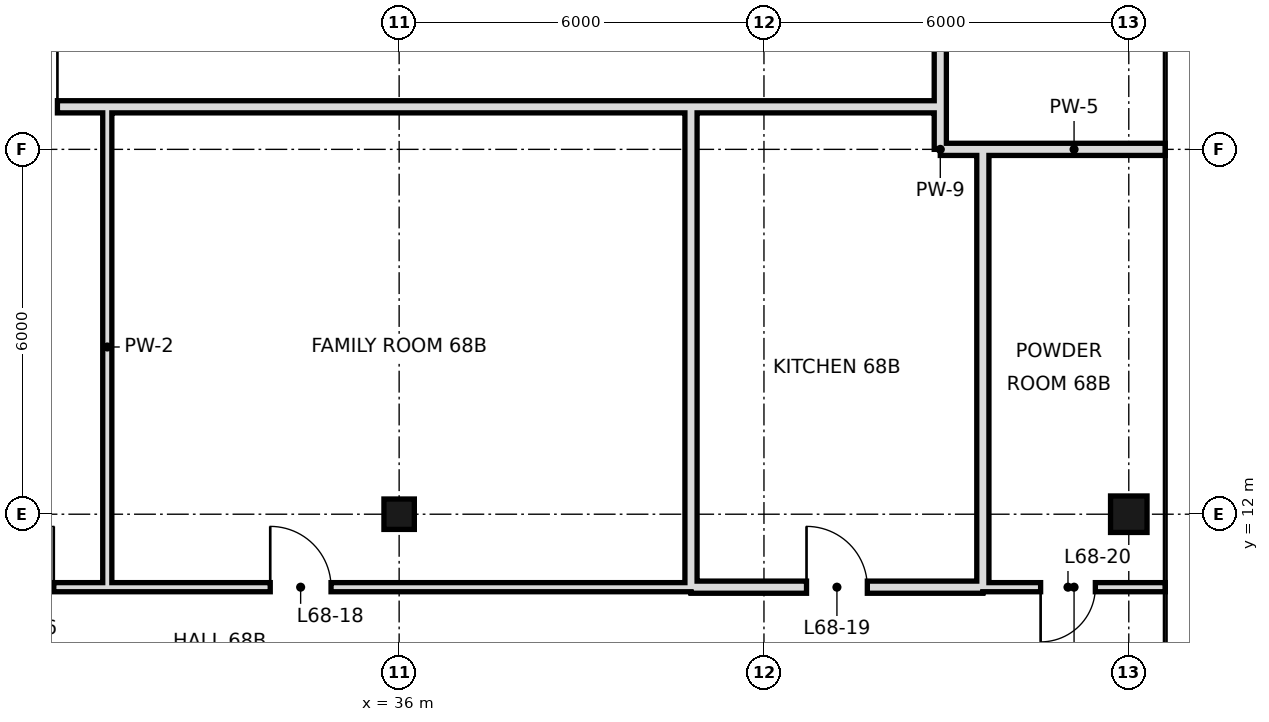
"""IFC4 building model, lengths in metres.
Left out: names, types, materials, properties, quantities, classifications, styles, units other than length and angle.
Written with IfcOpenShell. Run it as: python <this file> out.ifc"""

import sys

from ifc_helpers import new_model, si_unit, direction, frame, frame_2d, origin, origin_2d, place, context, subcontext, project, spatial, rectangle, hollow_rectangle, extrude, element, fill, save


model = new_model("IFC4")
c1 = context("Model", 3, precision=1e-05, world=origin(), true_north=direction((0.0, 1.0)))
c2 = subcontext(c1, "Body", "Model", "MODEL_VIEW")
j1 = project(units=[si_unit("LENGTHUNIT", "METRE"), si_unit("PLANEANGLEUNIT", "RADIAN")], contexts=[c1])
p1 = place(None, origin())
s1 = spatial("IfcSite", under=j1, at=p1, CompositionType="ELEMENT")
p2 = place(p1, origin())
s2 = spatial("IfcBuilding", under=s1, at=p2, CompositionType="ELEMENT")
p3 = place(p2, frame((0.0, 0.0, 290.8)))
s3 = spatial("IfcBuildingStorey", under=s2, at=p3, CompositionType="ELEMENT", Elevation=290.8)
p4 = place(p3, frame((36.0, 12.0, 0.0), z_axis=(0.0, 0.0, 1.0), x_axis=(1.0, 0.0, 0.0)))
e1 = element("IfcColumn", 1, at=p4, inside=s3, PredefinedType="COLUMN", context=c2, shape_type="SweptSolid", body=[
    extrude(hollow_rectangle(XDim=0.5, YDim=0.5, WallThickness=0.025, at=origin_2d()), origin(), (0.0, 0.0, 1.0), 3.6),
])
p5 = place(p3, frame((48.0, 12.0, 0.0), z_axis=(0.0, 0.0, 1.0), x_axis=(1.0, 0.0, 0.0)))
e2 = element("IfcColumn", 2, at=p5, inside=s3, PredefinedType="COLUMN", context=c2, shape_type="SweptSolid", body=[
    extrude(hollow_rectangle(XDim=0.6, YDim=0.6, WallThickness=0.028, at=origin_2d()), origin(), (0.0, 0.0, 1.0), 3.6),
])
p6 = place(p3, frame((31.2, 10.8, 0.0), z_axis=(0.0, 0.0, 1.0), x_axis=(0.0, 1.0, 0.0)))
e3 = element("IfcWall", 3, at=p6, inside=s3, PredefinedType="PARTITIONING", context=c2, shape_type="SweptSolid", body=[
    extrude(rectangle(XDim=7.9, YDim=0.15, at=frame_2d((3.95, 0.0))), origin(), (0.0, 0.0, 1.0), 3.42),
])
p7 = place(p3, frame((40.8, 10.8, 0.0), z_axis=(0.0, 0.0, 1.0), x_axis=(0.0, 1.0, 0.0)))
e4 = element("IfcWall", 4, at=p7, inside=s3, PredefinedType="SOLIDWALL", context=c2, shape_type="SweptSolid", body=[
    extrude(rectangle(XDim=7.9, YDim=0.2, at=frame_2d((3.95, 0.0))), origin(), (0.0, 0.0, 1.0), 2.72),
])
p8 = place(p3, frame((44.9, 18.7, 0.0), z_axis=(0.0, 0.0, 1.0), x_axis=(0.0, 1.0, 0.0)))
e5 = element("IfcWall", 5, at=p8, inside=s3, PredefinedType="SOLIDWALL", context=c2, shape_type="SweptSolid", body=[
    extrude(rectangle(XDim=27.249, YDim=0.2, at=frame_2d((13.625, 0.0))), origin(), (0.0, 0.0, 1.0), 2.97),
])
p9 = place(p8, frame((17.54, 0.0, 0.0)))
e6 = element("IfcOpeningElement", 6, at=p9, cuts=e5, PredefinedType="OPENING", context=c2, shape_type="SweptSolid", body=[
    extrude(rectangle(XDim=1.2, YDim=2.4, at=frame_2d((0.6, 1.2))), frame((0.0, 0.11, 0.0), z_axis=(0.0, -1.0, 0.0), x_axis=(1.0, 0.0, 0.0)), (0.0, 0.0, 1.0), 0.22),
])
p10 = place(p3, frame((44.9, 18.0, 0.0), z_axis=(0.0, 0.0, 1.0), x_axis=(0.0, 1.0, 0.0)))
e7 = element("IfcWall", 7, at=p10, inside=s3, PredefinedType="SOLIDWALL", context=c2, shape_type="SweptSolid", body=[
    extrude(rectangle(XDim=0.7, YDim=0.2, at=frame_2d((0.35, 0.0))), origin(), (0.0, 0.0, 1.0), 2.97),
])
p11 = place(p3, frame((45.6, 10.8, 0.0), z_axis=(0.0, 0.0, 1.0), x_axis=(0.0, 1.0, 0.0)))
e8 = element("IfcWall", 8, at=p11, inside=s3, PredefinedType="SOLIDWALL", context=c2, shape_type="SweptSolid", body=[
    extrude(rectangle(XDim=7.2, YDim=0.2, at=frame_2d((3.6, 0.0))), origin(), (0.0, 0.0, 1.0), 2.72),
])
p12 = place(p3, frame((40.8, 10.8, 0.0), z_axis=(0.0, 0.0, 1.0), x_axis=(1.0, 0.0, 0.0)))
e9 = element("IfcWall", 9, at=p12, inside=s3, PredefinedType="SOLIDWALL", context=c2, shape_type="SweptSolid", body=[
    extrude(rectangle(XDim=4.8, YDim=0.2, at=frame_2d((2.4, 0.0))), origin(), (0.0, 0.0, 1.0), 2.72),
])
p13 = place(p12, frame((1.9, 0.0, 0.0)))
e10 = element("IfcOpeningElement", 10, at=p13, cuts=e9, PredefinedType="OPENING", context=c2, shape_type="SweptSolid", body=[
    extrude(rectangle(XDim=1.0, YDim=2.4, at=frame_2d((0.5, 1.2))), frame((0.0, 0.11, 0.0), z_axis=(0.0, -1.0, 0.0), x_axis=(1.0, 0.0, 0.0)), (0.0, 0.0, 1.0), 0.22),
])
p14 = place(p3, frame((13.2, 10.8, 0.0), z_axis=(0.0, 0.0, 1.0), x_axis=(1.0, 0.0, 0.0)))
e11 = element("IfcWall", 11, at=p14, inside=s3, PredefinedType="PARTITIONING", context=c2, shape_type="SweptSolid", body=[
    extrude(rectangle(XDim=27.6, YDim=0.15, at=frame_2d((13.8, 0.0))), origin(), (0.0, 0.0, 1.0), 3.42),
])
p15 = place(p14, frame((2.56, 0.0, 0.0)))
e12 = element("IfcOpeningElement", 12, at=p15, cuts=e11, PredefinedType="OPENING", context=c2, shape_type="SweptSolid", body=[
    extrude(rectangle(XDim=1.0, YDim=2.4, at=frame_2d((0.5, 1.2))), frame((0.0, 0.085, 0.0), z_axis=(0.0, -1.0, 0.0), x_axis=(1.0, 0.0, 0.0)), (0.0, 0.0, 1.0), 0.17),
])
p16 = place(p14, frame((16.12, 0.0, 0.0)))
e13 = element("IfcOpeningElement", 13, at=p16, cuts=e11, PredefinedType="OPENING", context=c2, shape_type="SweptSolid", body=[
    extrude(rectangle(XDim=1.0, YDim=2.4, at=frame_2d((0.5, 1.2))), frame((0.0, 0.085, 0.0), z_axis=(0.0, -1.0, 0.0), x_axis=(1.0, 0.0, 0.0)), (0.0, 0.0, 1.0), 0.17),
])
p17 = place(p14, frame((9.1, 0.0, 0.0)))
e14 = element("IfcOpeningElement", 14, at=p17, cuts=e11, PredefinedType="OPENING", context=c2, shape_type="SweptSolid", body=[
    extrude(rectangle(XDim=1.0, YDim=2.4, at=frame_2d((0.5, 1.2))), frame((0.0, 0.085, 0.0), z_axis=(0.0, -1.0, 0.0), x_axis=(1.0, 0.0, 0.0)), (0.0, 0.0, 1.0), 0.17),
])
p18 = place(p14, frame((20.68, 0.0, 0.0)))
e15 = element("IfcOpeningElement", 15, at=p18, cuts=e11, PredefinedType="OPENING", context=c2, shape_type="SweptSolid", body=[
    extrude(rectangle(XDim=1.0, YDim=2.4, at=frame_2d((0.5, 1.2))), frame((0.0, 0.085, 0.0), z_axis=(0.0, -1.0, 0.0), x_axis=(1.0, 0.0, 0.0)), (0.0, 0.0, 1.0), 0.17),
])
p19 = place(p3, frame((45.6, 10.8, 0.0), z_axis=(0.0, 0.0, 1.0), x_axis=(1.0, 0.0, 0.0)))
e16 = element("IfcWall", 16, at=p19, inside=s3, PredefinedType="PARTITIONING", context=c2, shape_type="SweptSolid", body=[
    extrude(rectangle(XDim=3.0, YDim=0.15, at=frame_2d((1.5, 0.0))), origin(), (0.0, 0.0, 1.0), 3.42),
])
p20 = place(p19, frame((0.95, 0.0, 0.0)))
e17 = element("IfcOpeningElement", 17, at=p20, cuts=e16, PredefinedType="OPENING", context=c2, shape_type="SweptSolid", body=[
    extrude(rectangle(XDim=0.9, YDim=2.4, at=frame_2d((0.45, 1.2))), frame((0.0, 0.085, 0.0), z_axis=(0.0, -1.0, 0.0), x_axis=(1.0, 0.0, 0.0)), (0.0, 0.0, 1.0), 0.17),
])
p21 = place(p3, frame((45.6, 18.0, 0.0), z_axis=(0.0, 0.0, 1.0), x_axis=(1.0, 0.0, 0.0)))
e18 = element("IfcWall", 18, at=p21, inside=s3, PredefinedType="SOLIDWALL", context=c2, shape_type="SweptSolid", body=[
    extrude(rectangle(XDim=3.0, YDim=0.2, at=frame_2d((1.5, 0.0))), origin(), (0.0, 0.0, 1.0), 2.72),
])
p22 = place(p3, frame((44.9, 18.0, 0.0), z_axis=(0.0, 0.0, 1.0), x_axis=(1.0, 0.0, 0.0)))
e19 = element("IfcWall", 19, at=p22, inside=s3, PredefinedType="SOLIDWALL", context=c2, shape_type="SweptSolid", body=[
    extrude(rectangle(XDim=0.7, YDim=0.2, at=frame_2d((0.35, 0.0))), origin(), (0.0, 0.0, 1.0), 2.97),
])
p23 = place(p3, frame((13.2, 18.7, 0.0), z_axis=(0.0, 0.0, 1.0), x_axis=(1.0, 0.0, 0.0)))
e20 = element("IfcWall", 20, at=p23, inside=s3, PredefinedType="SOLIDWALL", context=c2, shape_type="SweptSolid", body=[
    extrude(rectangle(XDim=27.6, YDim=0.2, at=frame_2d((13.8, 0.0))), origin(), (0.0, 0.0, 1.0), 2.72),
])
p24 = place(p23, frame((1.8, 0.0, 0.0)))
e21 = element("IfcOpeningElement", 21, at=p24, cuts=e20, PredefinedType="OPENING", context=c2, shape_type="SweptSolid", body=[
    extrude(rectangle(XDim=1.2, YDim=2.4, at=frame_2d((0.6, 1.2))), frame((0.0, 0.11, 0.0), z_axis=(0.0, -1.0, 0.0), x_axis=(1.0, 0.0, 0.0)), (0.0, 0.0, 1.0), 0.22),
])
p25 = place(p23, frame((15.98, 0.0, 0.0)))
e22 = element("IfcOpeningElement", 22, at=p25, cuts=e20, PredefinedType="OPENING", context=c2, shape_type="SweptSolid", body=[
    extrude(rectangle(XDim=1.2, YDim=2.4, at=frame_2d((0.6, 1.2))), frame((0.0, 0.11, 0.0), z_axis=(0.0, -1.0, 0.0), x_axis=(1.0, 0.0, 0.0)), (0.0, 0.0, 1.0), 0.22),
])
p26 = place(p3, frame((40.8, 18.7, 0.0), z_axis=(0.0, 0.0, 1.0), x_axis=(1.0, 0.0, 0.0)))
e23 = element("IfcWall", 23, at=p26, inside=s3, PredefinedType="SOLIDWALL", context=c2, shape_type="SweptSolid", body=[
    extrude(rectangle(XDim=4.1, YDim=0.2, at=frame_2d((2.05, 0.0))), origin(), (0.0, 0.0, 1.0), 2.72),
])
p27 = place(p16, frame((1.0, 0.0, 0.0), z_axis=(0.0, 0.0, 1.0), x_axis=(-1.0, 0.0, 0.0)))
e24 = element("IfcDoor", 24, at=p27, inside=s3, OperationType="SINGLE_SWING_LEFT", PredefinedType="DOOR", context=c2, shape_type="SweptSolid", body=[
    extrude(rectangle(XDim=1.0, YDim=2.4, at=frame_2d((0.5, 1.2))), frame((0.0, 0.025, 0.0), z_axis=(0.0, -1.0, 0.0), x_axis=(1.0, 0.0, 0.0)), (0.0, 0.0, 1.0), 0.05),
])
fill(e13, e24)
p28 = place(p18, origin())
e25 = element("IfcDoor", 25, at=p28, inside=s3, OperationType="SINGLE_SWING_LEFT", PredefinedType="DOOR", context=c2, shape_type="SweptSolid", body=[
    extrude(rectangle(XDim=1.0, YDim=2.4, at=frame_2d((0.5, 1.2))), frame((0.0, 0.025, 0.0), z_axis=(0.0, -1.0, 0.0), x_axis=(1.0, 0.0, 0.0)), (0.0, 0.0, 1.0), 0.05),
])
fill(e15, e25)
p29 = place(p13, origin())
e26 = element("IfcDoor", 26, at=p29, inside=s3, OperationType="SINGLE_SWING_LEFT", PredefinedType="DOOR", context=c2, shape_type="SweptSolid", body=[
    extrude(rectangle(XDim=1.0, YDim=2.4, at=frame_2d((0.5, 1.2))), frame((0.0, 0.025, 0.0), z_axis=(0.0, -1.0, 0.0), x_axis=(1.0, 0.0, 0.0)), (0.0, 0.0, 1.0), 0.05),
])
fill(e10, e26)
p30 = place(p20, frame((0.9, 0.0, 0.0), z_axis=(0.0, 0.0, 1.0), x_axis=(-1.0, 0.0, 0.0)))
e27 = element("IfcDoor", 27, at=p30, inside=s3, OperationType="SINGLE_SWING_RIGHT", PredefinedType="DOOR", context=c2, shape_type="SweptSolid", body=[
    extrude(rectangle(XDim=0.9, YDim=2.4, at=frame_2d((0.45, 1.2))), frame((0.0, 0.025, 0.0), z_axis=(0.0, -1.0, 0.0), x_axis=(1.0, 0.0, 0.0)), (0.0, 0.0, 1.0), 0.05),
])
fill(e17, e27)
p31 = place(p25, frame((1.2, 0.0, 0.0), z_axis=(0.0, 0.0, 1.0), x_axis=(-1.0, 0.0, 0.0)))
e28 = element("IfcDoor", 28, at=p31, inside=s3, OperationType="SINGLE_SWING_LEFT", PredefinedType="DOOR", context=c2, shape_type="SweptSolid", body=[
    extrude(rectangle(XDim=1.2, YDim=2.4, at=frame_2d((0.6, 1.2))), frame((0.0, 0.025, 0.0), z_axis=(0.0, -1.0, 0.0), x_axis=(1.0, 0.0, 0.0)), (0.0, 0.0, 1.0), 0.05),
])
fill(e22, e28)
save(model, sys.argv[1])
